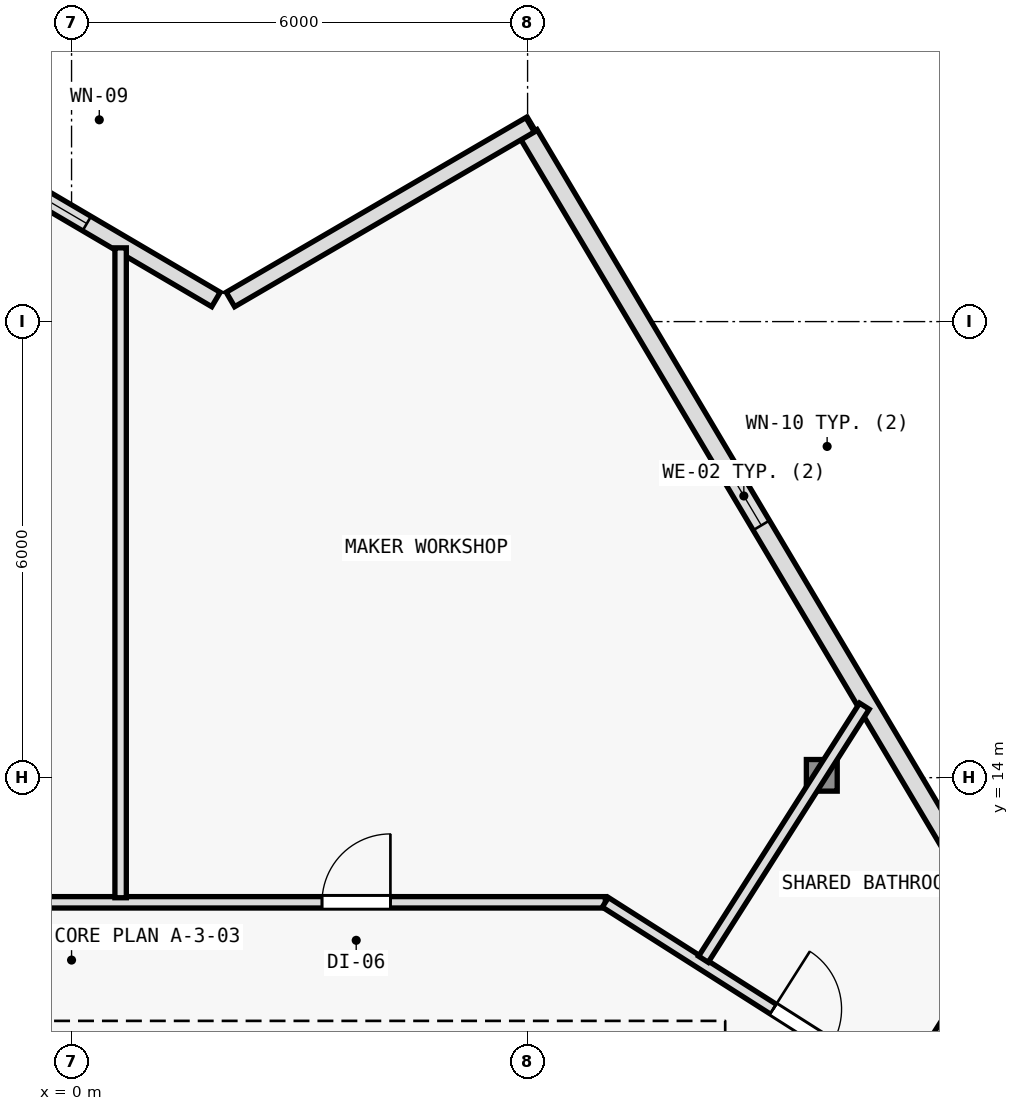
"""IFC4 building model, lengths in metres.
Left out: names, types, materials, properties, quantities, classifications, styles, units other than length and angle.
Written with IfcOpenShell. Run it as: python <this file> out.ifc"""

import sys

from ifc_helpers import new_model, si_unit, direction, frame, frame_2d, origin, origin_2d, place, context, subcontext, project, spatial, rectangle, i_section, extrude, element, fill, save


model = new_model("IFC4")
c1 = context("Model", 3, precision=1e-05, world=origin(), true_north=direction((0.0, 1.0)))
c2 = subcontext(c1, "Body", "Model", "MODEL_VIEW")
j1 = project(units=[si_unit("LENGTHUNIT", "METRE"), si_unit("PLANEANGLEUNIT", "RADIAN")], contexts=[c1])
p1 = place(None, origin())
s1 = spatial("IfcSite", under=j1, at=p1, CompositionType="ELEMENT")
p2 = place(p1, origin())
s2 = spatial("IfcBuilding", under=s1, at=p2, CompositionType="ELEMENT")
p3 = place(p2, frame((0.0, 0.0, 114.9)))
s3 = spatial("IfcBuildingStorey", under=s2, at=p3, CompositionType="ELEMENT", Elevation=114.9)
p4 = place(p3, frame((9.871, 14.031, 0.006), z_axis=(-0.011699842352, -0.002516826552, 0.999928387072), x_axis=(0.210305364179, -0.977635746993, 0.0)))
e1 = element("IfcColumn", 1, at=p4, inside=s3, PredefinedType="COLUMN", context=c2, shape_type="SweptSolid", body=[
    extrude(i_section(OverallWidth=0.406, OverallDepth=0.416, WebThickness=0.019, FlangeThickness=0.031, FilletRadius=0.015, at=origin_2d()), origin(), (0.0, 0.0, 1.0), 3.589),
])
p5 = place(p3, frame((6.017, 22.462, 0.0), z_axis=(0.0, 0.0, 1.0), x_axis=(0.511085523564, -0.859529864288, 0.0)))
e2 = element("IfcWall", 2, at=p5, inside=s3, PredefinedType="SOLIDWALL", context=c2, shape_type="SweptSolid", body=[
    extrude(rectangle(XDim=11.068, YDim=0.25, at=frame_2d((5.534, 0.0))), origin(), (0.0, 0.0, 1.0), 3.35),
])
p6 = place(p5, frame((5.084, 0.0, 0.62)))
e3 = element("IfcOpeningElement", 3, at=p6, cuts=e2, PredefinedType="OPENING", context=c2, shape_type="SweptSolid", body=[
    extrude(rectangle(XDim=0.9, YDim=1.6, at=frame_2d((0.45, 0.8))), frame((0.0, 0.135, 0.0), z_axis=(0.0, -1.0, 0.0), x_axis=(1.0, 0.0, 0.0)), (0.0, 0.0, 1.0), 0.27),
])
p7 = place(p3, frame((2.09, 20.291, 0.0), z_axis=(0.0, 0.0, 1.0), x_axis=(0.863978647835, 0.503528446153, 0.0)))
e4 = element("IfcWall", 4, at=p7, inside=s3, PredefinedType="SOLIDWALL", context=c2, shape_type="SweptSolid", body=[
    extrude(rectangle(XDim=4.564, YDim=0.22, at=frame_2d((2.282, 0.0))), origin(), (0.0, 0.0, 1.0), 3.35),
])
p8 = place(p3, frame((-2.447, 22.846, 0.0), z_axis=(0.0, 0.0, 1.0), x_axis=(0.8621357974, -0.506677280763, 0.0)))
e5 = element("IfcWall", 5, at=p8, inside=s3, PredefinedType="SOLIDWALL", context=c2, shape_type="SweptSolid", body=[
    extrude(rectangle(XDim=5.042, YDim=0.22, at=frame_2d((2.521, 0.0))), origin(), (0.0, 0.0, 1.0), 3.35),
])
p9 = place(p8, frame((1.971, 0.0, 0.62)))
e6 = element("IfcOpeningElement", 6, at=p9, cuts=e5, PredefinedType="OPENING", context=c2, shape_type="SweptSolid", body=[
    extrude(rectangle(XDim=1.1, YDim=1.8, at=frame_2d((0.55, 0.9))), frame((0.0, 0.12, 0.0), z_axis=(0.0, -1.0, 0.0), x_axis=(1.0, 0.0, 0.0)), (0.0, 0.0, 1.0), 0.24),
])
p10 = place(p3, frame((-7.041, 12.36, 0.0), z_axis=(0.0, 0.0, 1.0), x_axis=(1.0, 0.0, 0.0)))
e7 = element("IfcWall", 7, at=p10, inside=s3, PredefinedType="PARTITIONING", context=c2, shape_type="SweptSolid", body=[
    extrude(rectangle(XDim=14.064, YDim=0.15, at=frame_2d((7.032, 0.0))), origin(), (0.0, 0.0, 1.0), 3.35),
])
p11 = place(p10, frame((10.336, 0.0, 0.0)))
e8 = element("IfcOpeningElement", 8, at=p11, cuts=e7, PredefinedType="OPENING", context=c2, shape_type="SweptSolid", body=[
    extrude(rectangle(XDim=0.9, YDim=2.1, at=frame_2d((0.45, 1.05))), frame((0.0, 0.085, 0.0), z_axis=(0.0, -1.0, 0.0), x_axis=(1.0, 0.0, 0.0)), (0.0, 0.0, 1.0), 0.17),
])
p12 = place(p10, frame((3.482, 0.0, 0.0)))
e9 = element("IfcOpeningElement", 9, at=p12, cuts=e7, PredefinedType="OPENING", context=c2, shape_type="SweptSolid", body=[
    extrude(rectangle(XDim=0.9, YDim=2.1, at=frame_2d((0.45, 1.05))), frame((0.0, 0.085, 0.0), z_axis=(0.0, -1.0, 0.0), x_axis=(1.0, 0.0, 0.0)), (0.0, 0.0, 1.0), 0.17),
])
p13 = place(p3, frame((7.023, 12.36, 0.0), z_axis=(0.0, 0.0, 1.0), x_axis=(0.84376480085, -0.536713108511, 0.0)))
e10 = element("IfcWall", 10, at=p13, inside=s3, PredefinedType="PARTITIONING", context=c2, shape_type="SweptSolid", body=[
    extrude(rectangle(XDim=7.297, YDim=0.15, at=frame_2d((3.648, 0.0))), origin(), (0.0, 0.0, 1.0), 2.775),
])
p14 = place(p13, frame((2.617, 0.0, 0.0)))
e11 = element("IfcOpeningElement", 11, at=p14, cuts=e10, PredefinedType="OPENING", context=c2, shape_type="SweptSolid", body=[
    extrude(rectangle(XDim=0.9, YDim=2.1, at=frame_2d((0.45, 1.05))), frame((0.0, 0.085, 0.0), z_axis=(0.0, -1.0, 0.0), x_axis=(1.0, 0.0, 0.0)), (0.0, 0.0, 1.0), 0.17),
])
p15 = place(p3, frame((8.313, 11.611, 0.0), z_axis=(0.0, 0.0, 1.0), x_axis=(0.536683331262, 0.843783741219, 0.0)))
e12 = element("IfcWall", 12, at=p15, inside=s3, PredefinedType="PARTITIONING", context=c2, shape_type="SweptSolid", body=[
    extrude(rectangle(XDim=3.946, YDim=0.15, at=frame_2d((1.973, 0.0))), origin(), (0.0, 0.0, 1.0), 2.775),
])
p16 = place(p3, frame((10.973, 9.919, 0.0), z_axis=(0.0, 0.0, 1.0), x_axis=(0.536694294015, 0.843776768329, 0.0)))
e13 = element("IfcWall", 13, at=p16, inside=s3, PredefinedType="PARTITIONING", context=c2, shape_type="SweptSolid", body=[
    extrude(rectangle(XDim=2.354, YDim=0.15, at=frame_2d((1.177, 0.0))), origin(), (0.0, 0.0, 1.0), 2.885),
])
p17 = place(p3, frame((0.646, 12.42, 0.0), z_axis=(0.0, 0.0, 1.0), x_axis=(0.0, 1.0, 0.0)))
e14 = element("IfcWall", 14, at=p17, inside=s3, PredefinedType="PARTITIONING", context=c2, shape_type="SweptSolid", body=[
    extrude(rectangle(XDim=8.55, YDim=0.15, at=frame_2d((4.275, 0.0))), origin(), (0.0, 0.0, 1.0), 2.885),
])
p18 = place(p6, origin())
e15 = element("IfcWindow", 15, at=p18, inside=s3, PartitioningType="SINGLE_PANEL", PredefinedType="WINDOW", context=c2, shape_type="SweptSolid", body=[
    extrude(rectangle(XDim=0.9, YDim=1.6, at=frame_2d((0.45, 0.8))), frame((0.0, 0.03, 0.0), z_axis=(0.0, -1.0, 0.0), x_axis=(1.0, 0.0, 0.0)), (0.0, 0.0, 1.0), 0.06),
])
fill(e3, e15)
p19 = place(p9, origin())
e16 = element("IfcWindow", 16, at=p19, inside=s3, PartitioningType="SINGLE_PANEL", PredefinedType="WINDOW", context=c2, shape_type="SweptSolid", body=[
    extrude(rectangle(XDim=1.1, YDim=1.8, at=frame_2d((0.55, 0.9))), frame((0.0, 0.03, 0.0), z_axis=(0.0, -1.0, 0.0), x_axis=(1.0, 0.0, 0.0)), (0.0, 0.0, 1.0), 0.06),
])
fill(e6, e16)
p20 = place(p14, origin())
e17 = element("IfcDoor", 17, at=p20, inside=s3, OperationType="SINGLE_SWING_LEFT", PredefinedType="DOOR", context=c2, shape_type="SweptSolid", body=[
    extrude(rectangle(XDim=0.9, YDim=2.1, at=frame_2d((0.45, 1.05))), frame((0.0, 0.025, 0.0), z_axis=(0.0, -1.0, 0.0), x_axis=(1.0, 0.0, 0.0)), (0.0, 0.0, 1.0), 0.05),
])
fill(e11, e17)
p21 = place(p11, origin())
e18 = element("IfcDoor", 18, at=p21, inside=s3, OperationType="SINGLE_SWING_RIGHT", PredefinedType="DOOR", context=c2, shape_type="SweptSolid", body=[
    extrude(rectangle(XDim=0.9, YDim=2.1, at=frame_2d((0.45, 1.05))), frame((0.0, 0.025, 0.0), z_axis=(0.0, -1.0, 0.0), x_axis=(1.0, 0.0, 0.0)), (0.0, 0.0, 1.0), 0.05),
])
fill(e8, e18)
save(model, sys.argv[1])
